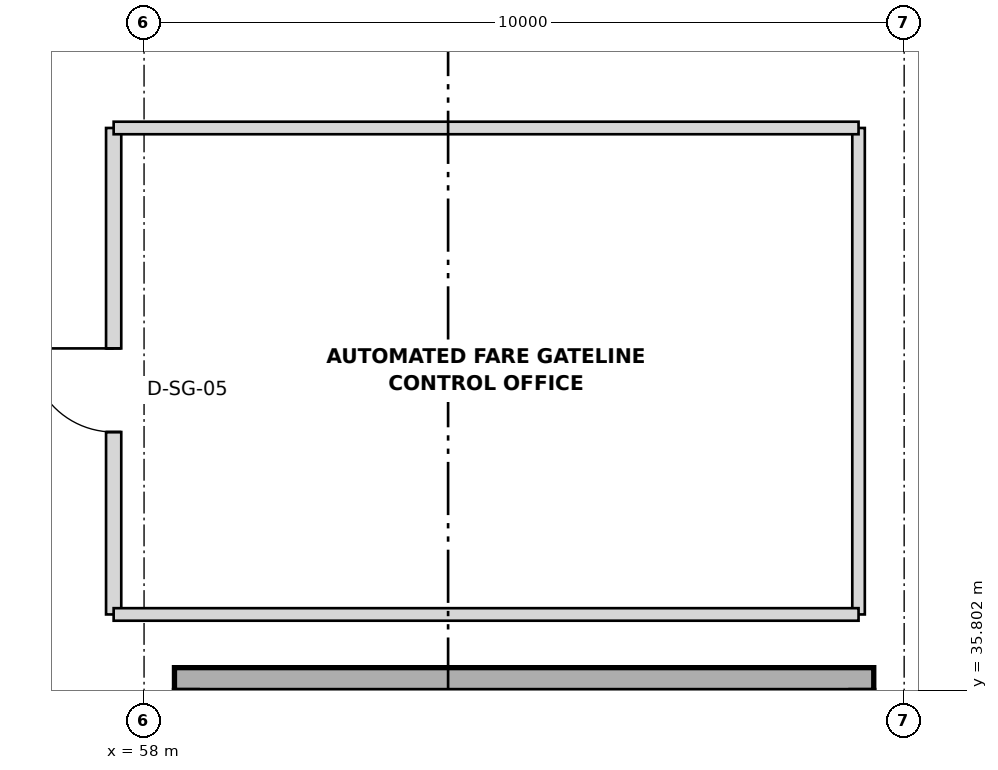
"""IFC4 building model, lengths in metres.
Left out: names, types, materials, properties, quantities, classifications, styles, units other than length and angle.
Written with IfcOpenShell. Run it as: python <this file> out.ifc"""

import sys

from ifc_helpers import new_model, si_unit, direction, frame, frame_2d, origin, place, context, subcontext, project, spatial, rectangle, extrude, element, fill, save


model = new_model("IFC4")
c1 = context("Model", 3, precision=1e-05, world=origin(), true_north=direction((0.0, 1.0)))
c2 = subcontext(c1, "Body", "Model", "MODEL_VIEW")
j1 = project(units=[si_unit("LENGTHUNIT", "METRE"), si_unit("PLANEANGLEUNIT", "RADIAN")], contexts=[c1])
p1 = place(None, origin())
s1 = spatial("IfcSite", under=j1, at=p1, CompositionType="ELEMENT")
p2 = place(p1, origin())
s2 = spatial("IfcBuilding", under=s1, at=p2, CompositionType="ELEMENT")
p3 = place(p2, frame((0.0, 0.0, 9.6)))
s3 = spatial("IfcBuildingStorey", under=s2, at=p3, CompositionType="ELEMENT", Elevation=9.6)
p4 = place(p3, frame((58.4, 35.95, 0.0), z_axis=(0.0, 0.0, 1.0), x_axis=(1.0, 0.0, 0.0)))
e1 = element("IfcWall", 1, at=p4, inside=s3, PredefinedType="SHEAR", context=c2, shape_type="SweptSolid", body=[
    extrude(rectangle(XDim=9.2, YDim=0.3, at=frame_2d((4.6, 0.0))), origin(), (0.0, 0.0, 1.0), 4.52),
])
p5 = place(p3, frame((57.6, 36.8, 0.0), z_axis=(0.0, 0.0, 1.0), x_axis=(0.0, 1.0, 0.0)))
e2 = element("IfcWall", 2, at=p5, inside=s3, PredefinedType="PARTITIONING", context=c2, shape_type="SweptSolid", body=[
    extrude(rectangle(XDim=6.4, YDim=0.2, at=frame_2d((3.2, 0.0))), origin(), (0.0, 0.0, 1.0), 3.55),
])
p6 = place(p5, frame((2.4, 0.0, 0.0)))
e3 = element("IfcOpeningElement", 3, at=p6, cuts=e2, PredefinedType="OPENING", context=c2, shape_type="SweptSolid", body=[
    extrude(rectangle(XDim=1.1, YDim=2.1, at=frame_2d((0.55, 1.05))), frame((0.0, 0.11, 0.0), z_axis=(0.0, -1.0, 0.0), x_axis=(1.0, 0.0, 0.0)), (0.0, 0.0, 1.0), 0.22),
])
p7 = place(p3, frame((67.4, 36.8, 0.0), z_axis=(0.0, 0.0, 1.0), x_axis=(0.0, 1.0, 0.0)))
e4 = element("IfcWall", 4, at=p7, inside=s3, PredefinedType="PARTITIONING", context=c2, shape_type="SweptSolid", body=[
    extrude(rectangle(XDim=6.4, YDim=0.165, at=frame_2d((3.2, 0.0))), origin(), (0.0, 0.0, 1.0), 3.55),
])
for number, where, z_axis, x_axis in (
    (5, (57.6, 36.8, 0.0), (0.0, 0.0, 1.0), (1.0, 0.0, 0.0)),
    (6, (57.6, 43.2, 0.0), (0.0, 0.0, 1.0), (1.0, 0.0, 0.0)),
):
    element("IfcWall", number, at=place(p3, frame(where, z_axis=z_axis, x_axis=x_axis)), inside=s3, PredefinedType="PARTITIONING", context=c2, shape_type="SweptSolid", body=[
        extrude(rectangle(XDim=9.8, YDim=0.165, at=frame_2d((4.9, 0.0))), origin(), (0.0, 0.0, 1.0), 3.55),
    ])
p8 = place(p6, origin())
e7 = element("IfcDoor", 7, at=p8, inside=s3, OperationType="SINGLE_SWING_RIGHT", PredefinedType="DOOR", context=c2, shape_type="SweptSolid", body=[
    extrude(rectangle(XDim=1.1, YDim=2.1, at=frame_2d((0.55, 1.05))), frame((0.0, 0.025, 0.0), z_axis=(0.0, -1.0, 0.0), x_axis=(1.0, 0.0, 0.0)), (0.0, 0.0, 1.0), 0.05),
])
fill(e3, e7)
save(model, sys.argv[1])
